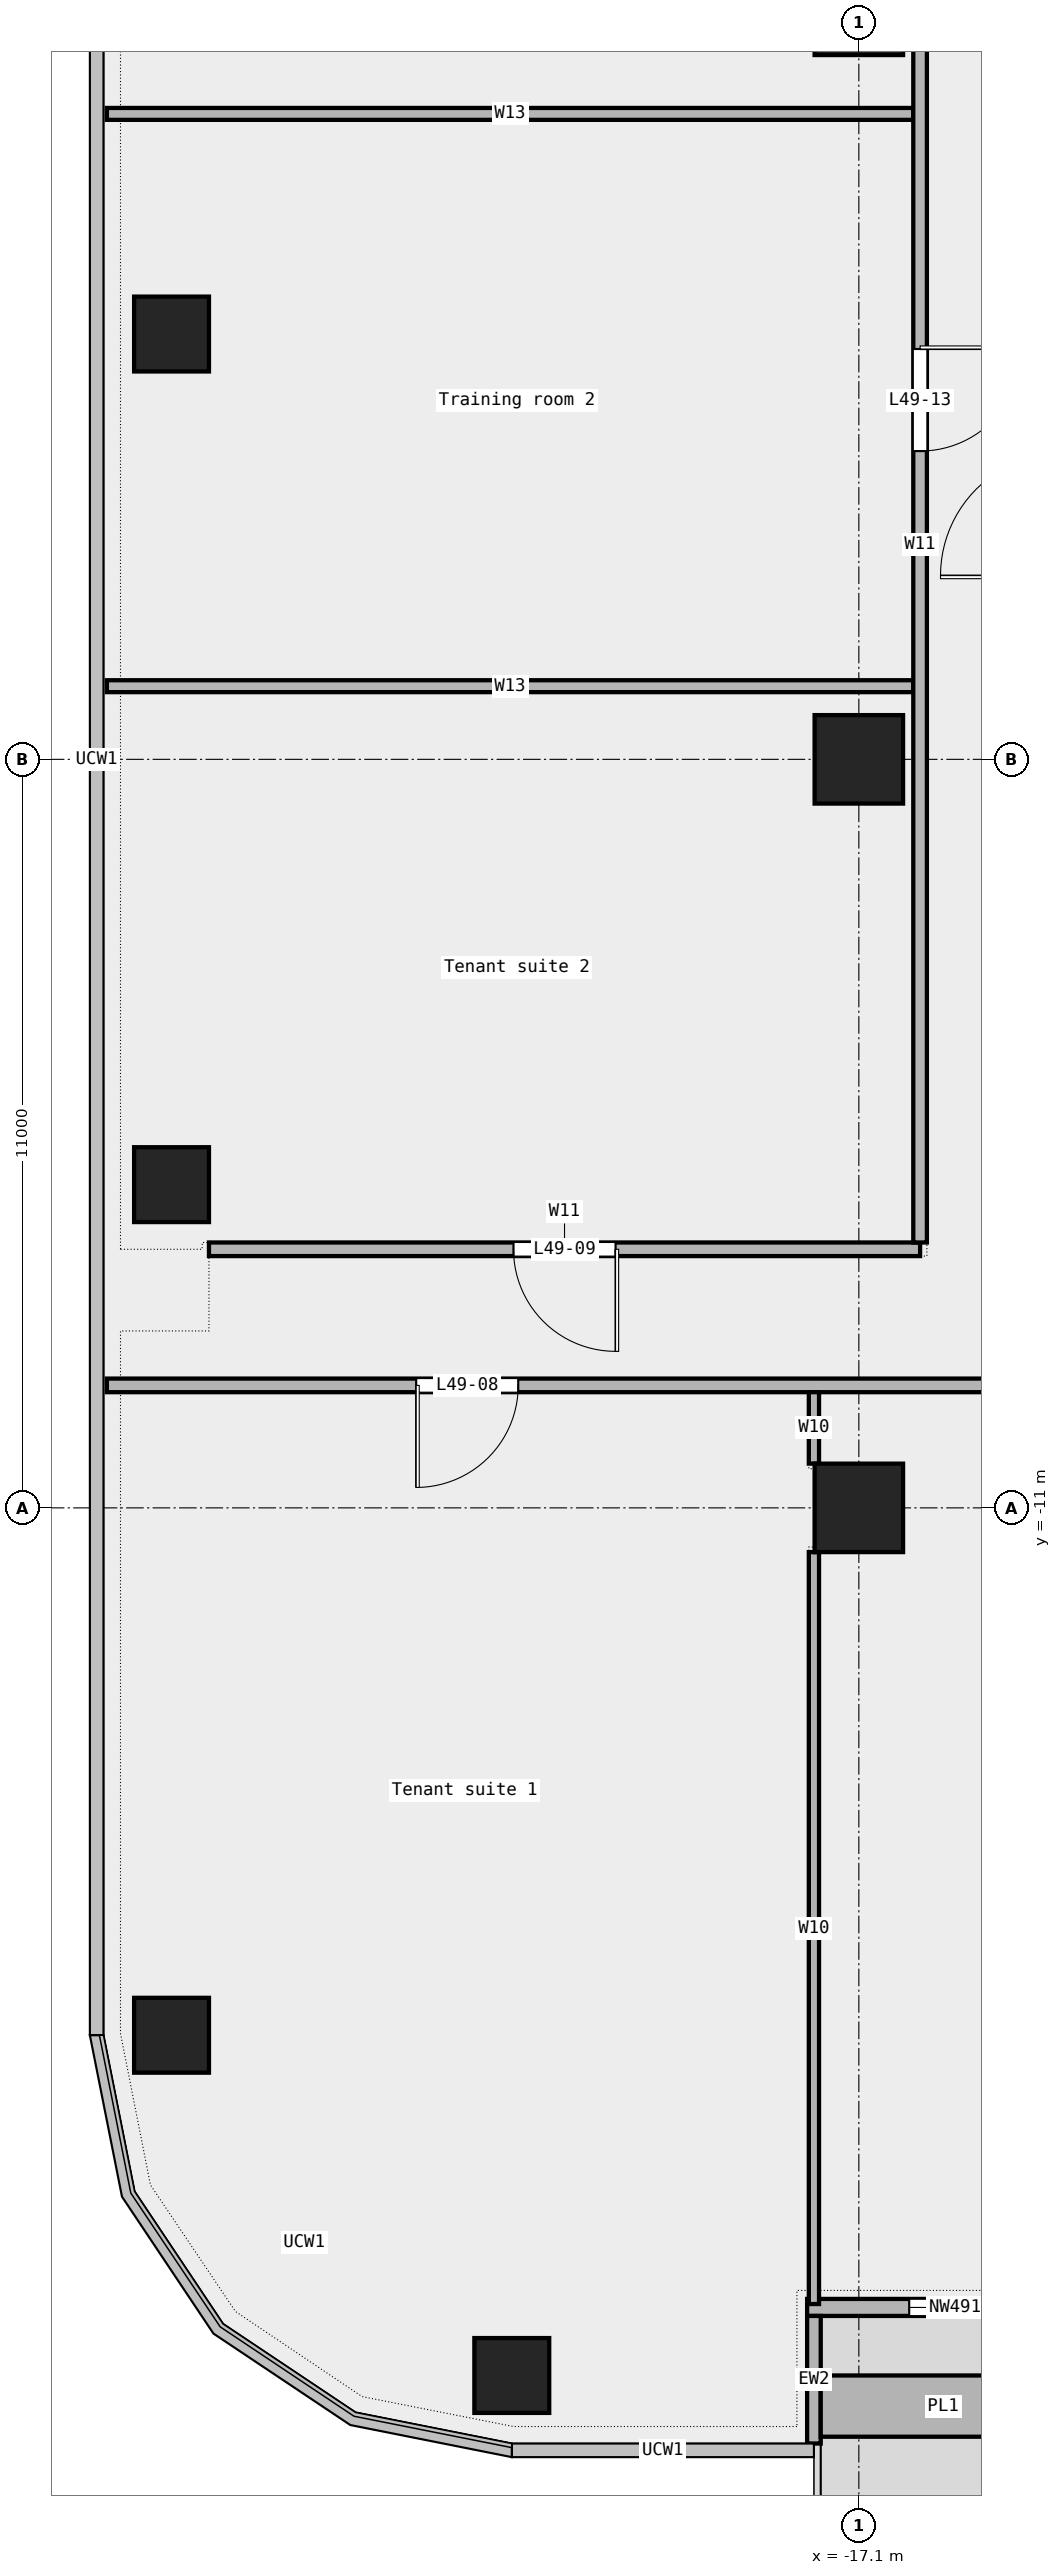
"""IFC4 building model, lengths in metres.
Left out: names, types, materials, properties, quantities, classifications, styles, units other than length and angle.
Written with IfcOpenShell. Run it as: python <this file> out.ifc"""

import sys

from ifc_helpers import new_model, si_unit, direction, frame, frame_2d, origin, origin_2d, place, context, subcontext, project, spatial, rectangle, extrude, element, fill, save


model = new_model("IFC4")
c1 = context("Model", 3, precision=1e-05, world=origin(), true_north=direction((0.0, 1.0)))
c2 = subcontext(c1, "Body", "Model", "MODEL_VIEW")
j1 = project(units=[si_unit("LENGTHUNIT", "METRE"), si_unit("PLANEANGLEUNIT", "RADIAN")], contexts=[c1])
p1 = place(None, origin())
s1 = spatial("IfcSite", under=j1, at=p1, CompositionType="ELEMENT")
p2 = place(p1, origin())
s2 = spatial("IfcBuilding", under=s1, at=p2, CompositionType="ELEMENT")
p3 = place(p2, frame((0.0, 0.0, 231.0)))
s3 = spatial("IfcBuildingStorey", under=s2, at=p3, CompositionType="ELEMENT", Elevation=231.0)
for number, where, z_axis, x_axis in (
    (1, (-22.2, -23.75, 0.0), (0.0, 0.0, 1.0), (1.0, 0.0, 0.0)),
    (2, (-27.2, 6.25, 0.0), (0.0, 0.0, 1.0), (1.0, 0.0, 0.0)),
    (3, (-27.2, -6.25, 0.0), (0.0, 0.0, 1.0), (1.0, 0.0, 0.0)),
    (4, (-27.2, -18.75, 0.0), (0.0, 0.0, 1.0), (1.0, 0.0, 0.0)),
):
    element("IfcColumn", number, at=place(p3, frame(where, z_axis=z_axis, x_axis=x_axis)), inside=s3, PredefinedType="COLUMN", context=c2, shape_type="SweptSolid", body=[
        extrude(rectangle(XDim=1.1, YDim=1.1, at=origin_2d()), origin(), (0.0, 0.0, 1.0), 3.6),
    ])
for number, where, z_axis, x_axis in (
    (5, (-17.1, -11.0, 0.0), (0.0, 0.0, 1.0), (1.0, 0.0, 0.0)),
    (6, (-17.1, 0.0, 0.0), (0.0, 0.0, 1.0), (1.0, 0.0, 0.0)),
    (7, (-17.1, 11.0, 0.0), (0.0, 0.0, 1.0), (1.0, 0.0, 0.0)),
):
    element("IfcColumn", number, at=place(p3, frame(where, z_axis=z_axis, x_axis=x_axis)), inside=s3, PredefinedType="COLUMN", context=c2, shape_type="SweptSolid", body=[
        extrude(rectangle(XDim=1.3, YDim=1.3, at=origin_2d()), origin(), (0.0, 0.0, 1.0), 3.6),
    ])
p4 = place(p3, frame((-17.86, -22.75, 0.0), z_axis=(0.0, 0.0, 1.0), x_axis=(1.0, 0.0, 0.0)))
e8 = element("IfcWall", 8, at=p4, inside=s3, PredefinedType="STANDARD", context=c2, shape_type="SweptSolid", body=[
    extrude(rectangle(XDim=13.52, YDim=0.25, at=frame_2d((6.76, 0.0))), origin(), (0.0, 0.0, 1.0), 3.6),
])
p5 = place(p4, frame((1.5, 0.0, 0.45)))
e9 = element("IfcOpeningElement", 9, at=p5, cuts=e8, PredefinedType="OPENING", context=c2, shape_type="SweptSolid", body=[
    extrude(rectangle(XDim=1.5, YDim=2.4, at=frame_2d((0.75, 1.2))), frame((0.0, 0.137, 0.0), z_axis=(0.0, -1.0, 0.0), x_axis=(1.0, 0.0, 0.0)), (0.0, 0.0, 1.0), 0.274),
])
p6 = place(p4, frame((4.0, 0.0, 0.0)))
e10 = element("IfcOpeningElement", 10, at=p6, cuts=e8, PredefinedType="OPENING", context=c2, shape_type="SweptSolid", body=[
    extrude(rectangle(XDim=1.8, YDim=2.4, at=frame_2d((0.9, 1.2))), frame((0.0, 0.137, 0.0), z_axis=(0.0, -1.0, 0.0), x_axis=(1.0, 0.0, 0.0)), (0.0, 0.0, 1.0), 0.274),
])
p7 = place(p4, frame((10.5, 0.0, 0.45)))
e11 = element("IfcOpeningElement", 11, at=p7, cuts=e8, PredefinedType="OPENING", context=c2, shape_type="SweptSolid", body=[
    extrude(rectangle(XDim=1.5, YDim=2.4, at=frame_2d((0.75, 1.2))), frame((0.0, 0.137, 0.0), z_axis=(0.0, -1.0, 0.0), x_axis=(1.0, 0.0, 0.0)), (0.0, 0.0, 1.0), 0.274),
])
p8 = place(p3, frame((-17.76, -24.75, 0.0), z_axis=(0.0, 0.0, 1.0), x_axis=(0.0, 1.0, 0.0)))
e12 = element("IfcWall", 12, at=p8, inside=s3, PredefinedType="STANDARD", context=c2, shape_type="SweptSolid", body=[
    extrude(rectangle(XDim=1.875, YDim=0.2, at=frame_2d((0.938, 0.0))), origin(), (0.0, 0.0, 1.0), 3.6),
])
p9 = place(p3, frame((-17.66, -24.2, 0.0), z_axis=(0.0, 0.0, 1.0), x_axis=(1.0, 0.0, 0.0)))
e13 = element("IfcWall", 13, at=p9, inside=s3, PredefinedType="STANDARD", context=c2, shape_type="SweptSolid", body=[
    extrude(rectangle(XDim=3.6, YDim=0.9, at=frame_2d((1.8, 0.0))), origin(), (0.0, 0.0, 1.0), 0.7),
])
p10 = place(p3, frame((-28.15, -9.2, 0.0), z_axis=(0.0, 0.0, 1.0), x_axis=(1.0, 0.0, 0.0)))
e14 = element("IfcWall", 14, at=p10, inside=s3, PredefinedType="PARTITIONING", context=c2, shape_type="SweptSolid", body=[
    extrude(rectangle(XDim=54.3, YDim=0.2, at=frame_2d((27.15, 0.0))), origin(), (0.0, 0.0, 1.0), 3.6),
])
p11 = place(p10, frame((47.212, 0.0, 0.0)))
e15 = element("IfcOpeningElement", 15, at=p11, cuts=e14, PredefinedType="OPENING", context=c2, shape_type="SweptSolid", body=[
    extrude(rectangle(XDim=1.8, YDim=2.1, at=frame_2d((0.9, 1.05))), frame((0.0, 0.112, 0.0), z_axis=(0.0, -1.0, 0.0), x_axis=(1.0, 0.0, 0.0)), (0.0, 0.0, 1.0), 0.224),
])
p12 = place(p10, frame((16.15, 0.0, 0.0)))
e16 = element("IfcOpeningElement", 16, at=p12, cuts=e14, PredefinedType="OPENING", context=c2, shape_type="SweptSolid", body=[
    extrude(rectangle(XDim=1.8, YDim=2.1, at=frame_2d((0.9, 1.05))), frame((0.0, 0.112, 0.0), z_axis=(0.0, -1.0, 0.0), x_axis=(1.0, 0.0, 0.0)), (0.0, 0.0, 1.0), 0.224),
])
p13 = place(p10, frame((4.545, 0.0, 0.0)))
e17 = element("IfcOpeningElement", 17, at=p13, cuts=e14, PredefinedType="OPENING", context=c2, shape_type="SweptSolid", body=[
    extrude(rectangle(XDim=1.5, YDim=2.1, at=frame_2d((0.75, 1.05))), frame((0.0, 0.112, 0.0), z_axis=(0.0, -1.0, 0.0), x_axis=(1.0, 0.0, 0.0)), (0.0, 0.0, 1.0), 0.224),
])
p14 = place(p10, frame((31.117, 0.0, 0.0)))
e18 = element("IfcOpeningElement", 18, at=p14, cuts=e14, PredefinedType="OPENING", context=c2, shape_type="SweptSolid", body=[
    extrude(rectangle(XDim=1.8, YDim=2.1, at=frame_2d((0.9, 1.05))), frame((0.0, 0.112, 0.0), z_axis=(0.0, -1.0, 0.0), x_axis=(1.0, 0.0, 0.0)), (0.0, 0.0, 1.0), 0.224),
])
p15 = place(p3, frame((-26.65, -7.2, 0.0), z_axis=(0.0, 0.0, 1.0), x_axis=(1.0, 0.0, 0.0)))
e19 = element("IfcWall", 19, at=p15, inside=s3, PredefinedType="PARTITIONING", context=c2, shape_type="SweptSolid", body=[
    extrude(rectangle(XDim=10.45, YDim=0.2, at=frame_2d((5.225, 0.0))), origin(), (0.0, 0.0, 1.0), 3.6),
])
p16 = place(p15, frame((4.475, 0.0, 0.0)))
e20 = element("IfcOpeningElement", 20, at=p16, cuts=e19, PredefinedType="OPENING", context=c2, shape_type="SweptSolid", body=[
    extrude(rectangle(XDim=1.5, YDim=2.1, at=frame_2d((0.75, 1.05))), frame((0.0, 0.112, 0.0), z_axis=(0.0, -1.0, 0.0), x_axis=(1.0, 0.0, 0.0)), (0.0, 0.0, 1.0), 0.224),
])
for number, where, z_axis, x_axis in (
    (21, (-28.15, 1.075, 0.0), (0.0, 0.0, 1.0), (1.0, 0.0, 0.0)),
    (22, (-28.15, 9.485, 0.0), (0.0, 0.0, 1.0), (1.0, 0.0, 0.0)),
):
    element("IfcWall", number, at=place(p3, frame(where, z_axis=z_axis, x_axis=x_axis)), inside=s3, PredefinedType="PARTITIONING", context=c2, shape_type="SweptSolid", body=[
        extrude(rectangle(XDim=11.85, YDim=0.175, at=frame_2d((5.925, 0.0))), origin(), (0.0, 0.0, 1.0), 3.6),
    ])
p17 = place(p3, frame((-17.76, -22.7, 0.0), z_axis=(0.0, 0.0, 1.0), x_axis=(0.0, 1.0, 0.0)))
e23 = element("IfcWall", 23, at=p17, inside=s3, PredefinedType="PARTITIONING", context=c2, shape_type="SweptSolid", body=[
    extrude(rectangle(XDim=11.05, YDim=0.15, at=frame_2d((5.525, 0.0))), origin(), (0.0, 0.0, 1.0), 3.6),
])
p18 = place(p3, frame((-17.76, -10.35, 0.0), z_axis=(0.0, 0.0, 1.0), x_axis=(0.0, 1.0, 0.0)))
e24 = element("IfcWall", 24, at=p18, inside=s3, PredefinedType="PARTITIONING", context=c2, shape_type="SweptSolid", body=[
    extrude(rectangle(XDim=1.05, YDim=0.15, at=frame_2d((0.525, 0.0))), origin(), (0.0, 0.0, 1.0), 3.6),
])
p19 = place(p3, frame((-16.2, -7.1, 0.0), z_axis=(0.0, 0.0, 1.0), x_axis=(0.0, 1.0, 0.0)))
e25 = element("IfcWall", 25, at=p19, inside=s3, PredefinedType="PARTITIONING", context=c2, shape_type="SweptSolid", body=[
    extrude(rectangle(XDim=20.5, YDim=0.2, at=frame_2d((10.25, 0.0))), origin(), (0.0, 0.0, 1.0), 3.6),
])
p20 = place(p19, frame((11.63, 0.0, 0.0)))
e26 = element("IfcOpeningElement", 26, at=p20, cuts=e25, PredefinedType="OPENING", context=c2, shape_type="SweptSolid", body=[
    extrude(rectangle(XDim=1.5, YDim=2.1, at=frame_2d((0.75, 1.05))), frame((0.0, 0.112, 0.0), z_axis=(0.0, -1.0, 0.0), x_axis=(1.0, 0.0, 0.0)), (0.0, 0.0, 1.0), 0.224),
])
p21 = place(p5, origin())
e27 = element("IfcWindow", 27, at=p21, inside=s3, PartitioningType="SINGLE_PANEL", PredefinedType="WINDOW", context=c2, shape_type="SweptSolid", body=[
    extrude(rectangle(XDim=1.5, YDim=2.4, at=frame_2d((0.75, 1.2))), frame((0.0, 0.03, 0.0), z_axis=(0.0, -1.0, 0.0), x_axis=(1.0, 0.0, 0.0)), (0.0, 0.0, 1.0), 0.06),
])
fill(e9, e27)
p22 = place(p13, origin())
e28 = element("IfcDoor", 28, at=p22, inside=s3, OperationType="DOUBLE_DOOR_SINGLE_SWING", PredefinedType="DOOR", context=c2, shape_type="SweptSolid", body=[
    extrude(rectangle(XDim=1.5, YDim=2.1, at=frame_2d((0.75, 1.05))), frame((0.0, 0.025, 0.0), z_axis=(0.0, -1.0, 0.0), x_axis=(1.0, 0.0, 0.0)), (0.0, 0.0, 1.0), 0.05),
])
fill(e17, e28)
p23 = place(p16, origin())
e29 = element("IfcDoor", 29, at=p23, inside=s3, OperationType="DOUBLE_DOOR_SINGLE_SWING", PredefinedType="DOOR", context=c2, shape_type="SweptSolid", body=[
    extrude(rectangle(XDim=1.5, YDim=2.1, at=frame_2d((0.75, 1.05))), frame((0.0, 0.025, 0.0), z_axis=(0.0, -1.0, 0.0), x_axis=(1.0, 0.0, 0.0)), (0.0, 0.0, 1.0), 0.05),
])
fill(e20, e29)
p24 = place(p20, origin())
e30 = element("IfcDoor", 30, at=p24, inside=s3, OperationType="DOUBLE_DOOR_SINGLE_SWING", PredefinedType="DOOR", context=c2, shape_type="SweptSolid", body=[
    extrude(rectangle(XDim=1.5, YDim=2.1, at=frame_2d((0.75, 1.05))), frame((0.0, 0.025, 0.0), z_axis=(0.0, -1.0, 0.0), x_axis=(1.0, 0.0, 0.0)), (0.0, 0.0, 1.0), 0.05),
])
fill(e26, e30)
save(model, sys.argv[1])
